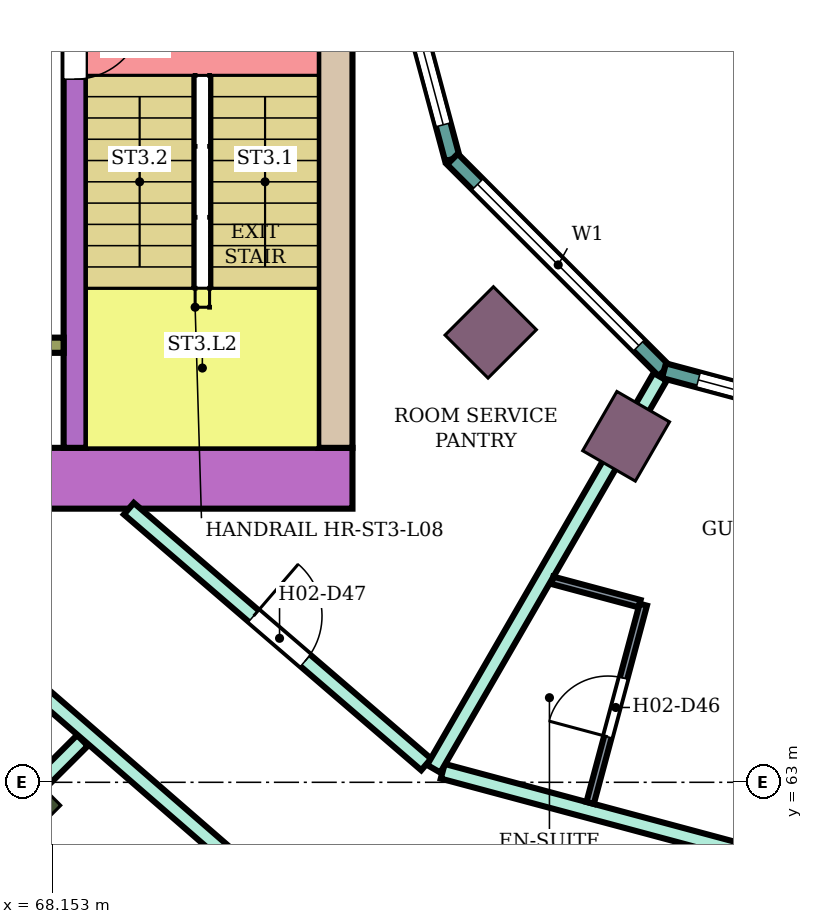
"""IFC4 building model, lengths in metres.
Left out: names, types, materials, properties, quantities, classifications, styles, units other than length and angle.
Written with IfcOpenShell. Run it as: python <this file> out.ifc"""

import sys

from ifc_helpers import new_model, si_unit, direction, frame, frame_2d, origin, origin_2d, place, context, subcontext, project, spatial, rectangle, extrude, element, fill, save


model = new_model("IFC4")
c1 = context("Model", 3, precision=1e-05, world=origin(), true_north=direction((0.0, 1.0)))
c2 = subcontext(c1, "Body", "Model", "MODEL_VIEW")
j1 = project(units=[si_unit("LENGTHUNIT", "METRE"), si_unit("PLANEANGLEUNIT", "RADIAN")], contexts=[c1])
p1 = place(None, origin())
s1 = spatial("IfcSite", under=j1, at=p1, CompositionType="ELEMENT")
p2 = place(p1, origin())
s2 = spatial("IfcBuilding", under=s1, at=p2, CompositionType="ELEMENT")
p3 = place(p2, frame((0.0, 0.0, 40.2)))
s3 = spatial("IfcBuildingStorey", under=s2, at=p3, CompositionType="ELEMENT", Elevation=40.2)
p4 = place(p3, frame((67.555, 62.555, 0.0), z_axis=(0.0, 0.0, 1.0), x_axis=(-0.707106781187, -0.707106781187, 0.0)))
e1 = element("IfcColumn", 1, at=p4, inside=s3, PredefinedType="COLUMN", context=c2, shape_type="SweptSolid", body=[
    extrude(rectangle(XDim=1.2, YDim=0.8, at=origin_2d()), origin(), (0.0, 0.0, 1.0), 3.8),
])
for number, where, z_axis, x_axis in (
    (2, (73.919, 68.919, 0.0), (0.0, 0.0, 1.0), (-0.707, -0.707, 0.0)),
    (3, (75.7, 67.552, 0.0), (0.0, 0.0, 1.0), (-0.5, -0.866, 0.0)),
):
    element("IfcColumn", number, at=place(p3, frame(where, z_axis=z_axis, x_axis=x_axis)), inside=s3, PredefinedType="COLUMN", context=c2, shape_type="SweptSolid", body=[
        extrude(rectangle(XDim=0.9, YDim=0.8, at=origin_2d()), origin(), (0.0, 0.0, 1.0), 3.8),
    ])
p5 = place(p3, frame((72.1, 67.0, 0.0), z_axis=(0.0, 0.0, 1.0), x_axis=(-1.0, 0.0, 0.0)))
e4 = element("IfcWall", 4, at=p5, inside=s3, PredefinedType="SHEAR", context=c2, shape_type="SweptSolid", body=[
    extrude(rectangle(XDim=14.7, YDim=0.8, at=frame_2d((7.35, 0.0))), origin(), (0.0, 0.0, 1.0), 3.48),
])
p6 = place(p5, frame((4.2, 0.0, 0.0)))
e5 = element("IfcOpeningElement", 5, at=p6, cuts=e4, PredefinedType="OPENING", context=c2, shape_type="SweptSolid", body=[
    extrude(rectangle(XDim=2.4, YDim=2.4, at=frame_2d((1.2, 1.2))), frame((0.0, 0.41, 0.0), z_axis=(0.0, -1.0, 0.0), x_axis=(1.0, 0.0, 0.0)), (0.0, 0.0, 1.0), 0.82),
])
p7 = place(p3, frame((71.875, 75.0, 0.0), z_axis=(0.0, 0.0, 1.0), x_axis=(0.0, -1.0, 0.0)))
e6 = element("IfcWall", 6, at=p7, inside=s3, PredefinedType="SHEAR", context=c2, shape_type="SweptSolid", body=[
    extrude(rectangle(XDim=7.6, YDim=0.45, at=frame_2d((3.8, 0.0))), origin(), (0.0, 0.0, 1.0), 3.48),
])
p8 = place(p3, frame((68.45, 75.0, 0.0), z_axis=(0.0, 0.0, 1.0), x_axis=(0.0, -1.0, 0.0)))
e7 = element("IfcWall", 7, at=p8, inside=s3, PredefinedType="SHEAR", context=c2, shape_type="SweptSolid", body=[
    extrude(rectangle(XDim=7.6, YDim=0.3, at=frame_2d((3.8, 0.0))), origin(), (0.0, 0.0, 1.0), 3.48),
])
p9 = place(p8, frame((1.85, 0.0, 0.0)))
e8 = element("IfcOpeningElement", 8, at=p9, cuts=e7, PredefinedType="OPENING", context=c2, shape_type="SweptSolid", body=[
    extrude(rectangle(XDim=0.9, YDim=2.1, at=frame_2d((0.45, 1.05))), frame((0.0, 0.16, 0.0), z_axis=(0.0, -1.0, 0.0), x_axis=(1.0, 0.0, 0.0)), (0.0, 0.0, 1.0), 0.32),
])
p10 = place(p3, frame((68.3, 68.75, 0.0), z_axis=(0.0, 0.0, 1.0), x_axis=(-1.0, 0.0, 0.0)))
e9 = element("IfcWall", 9, at=p10, inside=s3, PredefinedType="SHEAR", context=c2, shape_type="SweptSolid", body=[
    extrude(rectangle(XDim=4.65, YDim=0.2, at=frame_2d((2.325, 0.0))), origin(), (0.0, 0.0, 1.0), 3.48),
])
p11 = place(p3, frame((72.396, 75.0, 0.0), z_axis=(0.0, 0.0, 1.0), x_axis=(0.258789828301, -0.965933654434, 0.0)))
e10 = element("IfcWall", 10, at=p11, inside=s3, PredefinedType="NOTDEFINED", context=c2, shape_type="SweptSolid", body=[
    extrude(rectangle(XDim=3.936, YDim=0.2, at=frame_2d((1.968, 0.0))), origin(), (0.0, 0.0, 1.0), 3.8),
])
p12 = place(p11, frame((0.468, 0.0, 0.9)))
e11 = element("IfcOpeningElement", 11, at=p12, cuts=e10, PredefinedType="OPENING", context=c2, shape_type="SweptSolid", body=[
    extrude(rectangle(XDim=3.0, YDim=2.3, at=frame_2d((1.5, 1.15))), frame((0.0, 0.11, 0.0), z_axis=(0.0, -1.0, 0.0), x_axis=(1.0, 0.0, 0.0)), (0.0, 0.0, 1.0), 0.22),
])
p13 = place(p3, frame((73.415, 71.198, 0.0), z_axis=(0.0, 0.0, 1.0), x_axis=(0.707106781187, -0.707106781187, 0.0)))
e12 = element("IfcWall", 12, at=p13, inside=s3, PredefinedType="NOTDEFINED", context=c2, shape_type="SweptSolid", body=[
    extrude(rectangle(XDim=3.936, YDim=0.2, at=frame_2d((1.968, 0.0))), origin(), (0.0, 0.0, 1.0), 3.8),
])
p14 = place(p13, frame((0.468, 0.0, 0.9)))
e13 = element("IfcOpeningElement", 13, at=p14, cuts=e12, PredefinedType="OPENING", context=c2, shape_type="SweptSolid", body=[
    extrude(rectangle(XDim=3.0, YDim=2.3, at=frame_2d((1.5, 1.15))), frame((0.0, 0.11, 0.0), z_axis=(0.0, -1.0, 0.0), x_axis=(1.0, 0.0, 0.0)), (0.0, 0.0, 1.0), 0.22),
])
p15 = place(p3, frame((76.198, 68.415, 0.0), z_axis=(0.0, 0.0, 1.0), x_axis=(0.965933654434, -0.258789828301, 0.0)))
e14 = element("IfcWall", 14, at=p15, inside=s3, PredefinedType="NOTDEFINED", context=c2, shape_type="SweptSolid", body=[
    extrude(rectangle(XDim=3.936, YDim=0.2, at=frame_2d((1.968, 0.0))), origin(), (0.0, 0.0, 1.0), 3.8),
])
p16 = place(p15, frame((0.468, 0.0, 0.9)))
e15 = element("IfcOpeningElement", 15, at=p16, cuts=e14, PredefinedType="OPENING", context=c2, shape_type="SweptSolid", body=[
    extrude(rectangle(XDim=3.0, YDim=2.3, at=frame_2d((1.5, 1.15))), frame((0.0, 0.11, 0.0), z_axis=(0.0, -1.0, 0.0), x_axis=(1.0, 0.0, 0.0)), (0.0, 0.0, 1.0), 0.22),
])
p17 = place(p3, frame((63.594, 58.598, 0.0), z_axis=(0.0, 0.0, 1.0), x_axis=(0.707228748718, 0.706984792613, 0.0)))
e16 = element("IfcWall", 16, at=p17, inside=s3, PredefinedType="PARTITIONING", context=c2, shape_type="SweptSolid", body=[
    extrude(rectangle(XDim=7.005, YDim=0.2, at=frame_2d((3.503, 0.0))), origin(), (0.0, 0.0, 1.0), 3.35),
])
p18 = place(p3, frame((67.082, 64.972, 0.0), z_axis=(0.0, 0.0, 1.0), x_axis=(0.755033632617, -0.655686063309, 0.0)))
e17 = element("IfcWall", 17, at=p18, inside=s3, PredefinedType="PARTITIONING", context=c2, shape_type="SweptSolid", body=[
    extrude(rectangle(XDim=6.185, YDim=0.2, at=frame_2d((3.093, 0.0))), origin(), (0.0, 0.0, 1.0), 3.35),
])
p19 = place(p18, frame((4.778, 0.0, 0.0)))
e18 = element("IfcOpeningElement", 18, at=p19, cuts=e17, PredefinedType="OPENING", context=c2, shape_type="SweptSolid", body=[
    extrude(rectangle(XDim=1.1, YDim=2.1, at=frame_2d((0.55, 1.05))), frame((0.0, 0.11, 0.0), z_axis=(0.0, -1.0, 0.0), x_axis=(1.0, 0.0, 0.0)), (0.0, 0.0, 1.0), 0.22),
])
p20 = place(p3, frame((69.158, 66.6, 0.0), z_axis=(0.0, 0.0, 1.0), x_axis=(0.758063092745, -0.652181222835, 0.0)))
e19 = element("IfcWall", 19, at=p20, inside=s3, PredefinedType="PARTITIONING", context=c2, shape_type="SweptSolid", body=[
    extrude(rectangle(XDim=5.16, YDim=0.2, at=frame_2d((2.58, 0.0))), origin(), (0.0, 0.0, 1.0), 3.35),
])
p21 = place(p20, frame((2.165, 0.0, 0.0)))
e20 = element("IfcOpeningElement", 20, at=p21, cuts=e19, PredefinedType="OPENING", context=c2, shape_type="SweptSolid", body=[
    extrude(rectangle(XDim=0.9, YDim=2.1, at=frame_2d((0.45, 1.05))), frame((0.0, 0.11, 0.0), z_axis=(0.0, -1.0, 0.0), x_axis=(1.0, 0.0, 0.0)), (0.0, 0.0, 1.0), 0.22),
])
p22 = place(p3, frame((73.287, 63.145, 0.0), z_axis=(0.0, 0.0, 1.0), x_axis=(0.965854200194, -0.259086209526, 0.0)))
e21 = element("IfcWall", 21, at=p22, inside=s3, PredefinedType="PARTITIONING", context=c2, shape_type="SweptSolid", body=[
    extrude(rectangle(XDim=6.82, YDim=0.2, at=frame_2d((3.41, 0.0))), origin(), (0.0, 0.0, 1.0), 3.35),
])
p23 = place(p22, frame((5.4, 0.0, 0.0)))
e22 = element("IfcOpeningElement", 22, at=p23, cuts=e21, PredefinedType="OPENING", context=c2, shape_type="SweptSolid", body=[
    extrude(rectangle(XDim=1.0, YDim=2.1, at=frame_2d((0.5, 1.05))), frame((0.0, 0.11, 0.0), z_axis=(0.0, -1.0, 0.0), x_axis=(1.0, 0.0, 0.0)), (0.0, 0.0, 1.0), 0.22),
])
p24 = place(p3, frame((73.169, 63.178, 0.0), z_axis=(0.0, 0.0, 1.0), x_axis=(0.50020860964, 0.865904929448, 0.0)))
e23 = element("IfcWall", 23, at=p24, inside=s3, PredefinedType="PARTITIONING", context=c2, shape_type="SweptSolid", body=[
    extrude(rectangle(XDim=5.955, YDim=0.2, at=frame_2d((2.978, 0.0))), origin(), (0.0, 0.0, 1.0), 3.35),
])
p25 = place(p3, frame((74.729, 65.657, 0.0), z_axis=(0.0, 0.0, 1.0), x_axis=(0.965948051503, -0.258736085224, 0.0)))
e24 = element("IfcWall", 24, at=p25, inside=s3, PredefinedType="PARTITIONING", context=c2, shape_type="SweptSolid", body=[
    extrude(rectangle(XDim=1.189, YDim=0.1, at=frame_2d((0.594, 0.0))), origin(), (0.0, 0.0, 1.0), 3.35),
])
p26 = place(p3, frame((75.227, 62.729, 0.0), z_axis=(0.0, 0.0, 1.0), x_axis=(0.258945475746, 0.965891940432, 0.0)))
e25 = element("IfcWall", 25, at=p26, inside=s3, PredefinedType="PARTITIONING", context=c2, shape_type="SweptSolid", body=[
    extrude(rectangle(XDim=2.7, YDim=0.1, at=frame_2d((1.35, 0.0))), origin(), (0.0, 0.0, 1.0), 3.35),
])
p27 = place(p26, frame((0.9, 0.0, 0.0)))
e26 = element("IfcOpeningElement", 26, at=p27, cuts=e25, PredefinedType="OPENING", context=c2, shape_type="SweptSolid", body=[
    extrude(rectangle(XDim=0.8, YDim=2.1, at=frame_2d((0.4, 1.05))), frame((0.0, 0.06, 0.0), z_axis=(0.0, -1.0, 0.0), x_axis=(1.0, 0.0, 0.0)), (0.0, 0.0, 1.0), 0.12),
])
p28 = place(p12, origin())
e27 = element("IfcWindow", 27, at=p28, inside=s3, PartitioningType="SINGLE_PANEL", PredefinedType="WINDOW", context=c2, shape_type="SweptSolid", body=[
    extrude(rectangle(XDim=3.0, YDim=2.3, at=frame_2d((1.5, 1.15))), frame((0.0, 0.03, 0.0), z_axis=(0.0, -1.0, 0.0), x_axis=(1.0, 0.0, 0.0)), (0.0, 0.0, 1.0), 0.06),
])
fill(e11, e27)
p29 = place(p14, origin())
e28 = element("IfcWindow", 28, at=p29, inside=s3, PartitioningType="SINGLE_PANEL", PredefinedType="WINDOW", context=c2, shape_type="SweptSolid", body=[
    extrude(rectangle(XDim=3.0, YDim=2.3, at=frame_2d((1.5, 1.15))), frame((0.0, 0.03, 0.0), z_axis=(0.0, -1.0, 0.0), x_axis=(1.0, 0.0, 0.0)), (0.0, 0.0, 1.0), 0.06),
])
fill(e13, e28)
p30 = place(p16, origin())
e29 = element("IfcWindow", 29, at=p30, inside=s3, PartitioningType="SINGLE_PANEL", PredefinedType="WINDOW", context=c2, shape_type="SweptSolid", body=[
    extrude(rectangle(XDim=3.0, YDim=2.3, at=frame_2d((1.5, 1.15))), frame((0.0, 0.03, 0.0), z_axis=(0.0, -1.0, 0.0), x_axis=(1.0, 0.0, 0.0)), (0.0, 0.0, 1.0), 0.06),
])
fill(e15, e29)
p31 = place(p27, origin())
e30 = element("IfcDoor", 30, at=p31, inside=s3, OperationType="SINGLE_SWING_LEFT", PredefinedType="DOOR", context=c2, shape_type="SweptSolid", body=[
    extrude(rectangle(XDim=0.8, YDim=2.1, at=frame_2d((0.4, 1.05))), frame((0.0, 0.025, 0.0), z_axis=(0.0, -1.0, 0.0), x_axis=(1.0, 0.0, 0.0)), (0.0, 0.0, 1.0), 0.05),
])
fill(e26, e30)
p32 = place(p21, origin())
e31 = element("IfcDoor", 31, at=p32, inside=s3, OperationType="SINGLE_SWING_LEFT", PredefinedType="DOOR", context=c2, shape_type="SweptSolid", body=[
    extrude(rectangle(XDim=0.9, YDim=2.1, at=frame_2d((0.45, 1.05))), frame((0.0, 0.025, 0.0), z_axis=(0.0, -1.0, 0.0), x_axis=(1.0, 0.0, 0.0)), (0.0, 0.0, 1.0), 0.05),
])
fill(e20, e31)
p33 = place(p9, origin())
e32 = element("IfcDoor", 32, at=p33, inside=s3, OperationType="SINGLE_SWING_LEFT", PredefinedType="DOOR", context=c2, shape_type="SweptSolid", body=[
    extrude(rectangle(XDim=0.9, YDim=2.1, at=frame_2d((0.45, 1.05))), frame((0.0, 0.025, 0.0), z_axis=(0.0, -1.0, 0.0), x_axis=(1.0, 0.0, 0.0)), (0.0, 0.0, 1.0), 0.05),
])
fill(e8, e32)
save(model, sys.argv[1])
